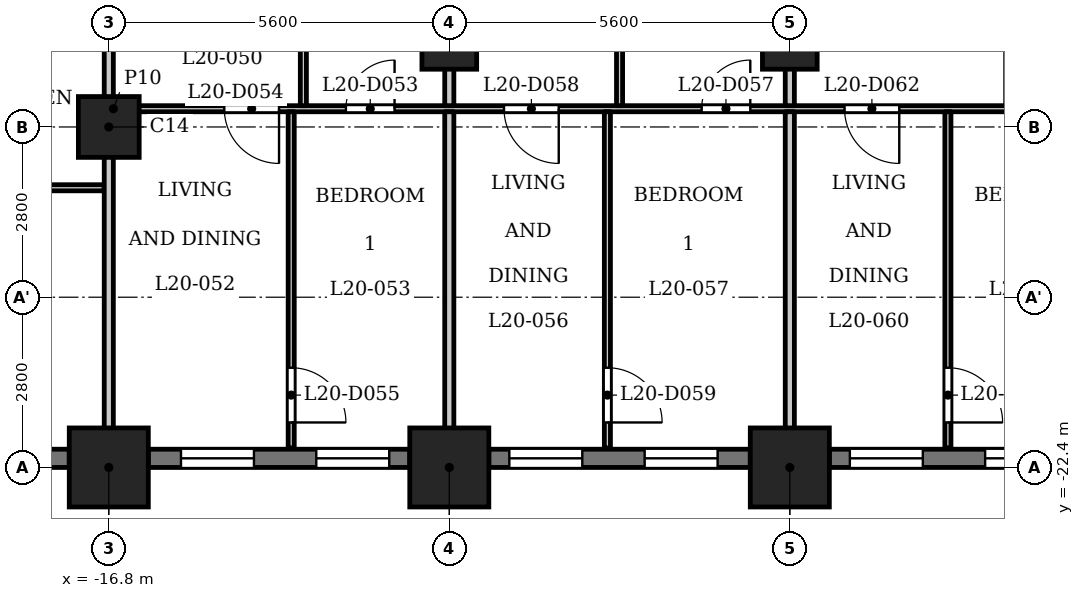
"""IFC4 building model, lengths in metres.
Left out: names, types, materials, properties, quantities, classifications, styles, units other than length and angle.
Written with IfcOpenShell. Run it as: python <this file> out.ifc"""

import sys

from ifc_helpers import new_model, si_unit, direction, frame, frame_2d, origin, origin_2d, place, context, subcontext, project, spatial, rectangle, extrude, element, fill, save


model = new_model("IFC4")
c1 = context("Model", 3, precision=1e-05, world=origin(), true_north=direction((0.0, 1.0)))
c2 = subcontext(c1, "Body", "Model", "MODEL_VIEW")
j1 = project(units=[si_unit("LENGTHUNIT", "METRE"), si_unit("PLANEANGLEUNIT", "RADIAN")], contexts=[c1])
p1 = place(None, origin())
s1 = spatial("IfcSite", under=j1, at=p1, CompositionType="ELEMENT")
p2 = place(p1, origin())
s2 = spatial("IfcBuilding", under=s1, at=p2, CompositionType="ELEMENT")
p3 = place(p2, frame((0.0, 0.0, 83.3)))
s3 = spatial("IfcBuildingStorey", under=s2, at=p3, CompositionType="ELEMENT", Elevation=83.3)
for number, where, z_axis, x_axis in (
    (1, (-16.8, -22.4, 0.0), (0.0, 0.0, 1.0), (1.0, 0.0, 0.0)),
    (2, (-11.2, -22.4, 0.0), (0.0, 0.0, 1.0), (1.0, 0.0, 0.0)),
    (3, (-5.6, -22.4, 0.0), (0.0, 0.0, 1.0), (1.0, 0.0, 0.0)),
):
    element("IfcColumn", number, at=place(p3, frame(where, z_axis=z_axis, x_axis=x_axis)), inside=s3, PredefinedType="COLUMN", context=c2, shape_type="SweptSolid", body=[
        extrude(rectangle(XDim=1.3, YDim=1.3, at=origin_2d()), origin(), (0.0, 0.0, 1.0), 3.5),
    ])
p4 = place(p3, frame((-16.8, -16.8, 0.0), z_axis=(0.0, 0.0, 1.0), x_axis=(1.0, 0.0, 0.0)))
e4 = element("IfcColumn", 4, at=p4, inside=s3, PredefinedType="COLUMN", context=c2, shape_type="SweptSolid", body=[
    extrude(rectangle(XDim=1.0, YDim=1.0, at=origin_2d()), origin(), (0.0, 0.0, 1.0), 3.5),
])
for number, where, z_axis, x_axis in (
    (5, (-11.2, -15.4, 0.0), (0.0, 0.0, 1.0), (1.0, 0.0, 0.0)),
    (6, (-5.6, -15.4, 0.0), (0.0, 0.0, 1.0), (1.0, 0.0, 0.0)),
):
    element("IfcColumn", number, at=place(p3, frame(where, z_axis=z_axis, x_axis=x_axis)), inside=s3, PredefinedType="COLUMN", context=c2, shape_type="SweptSolid", body=[
        extrude(rectangle(XDim=0.9, YDim=0.9, at=origin_2d()), origin(), (0.0, 0.0, 1.0), 3.5),
    ])
p5 = place(p3, frame((-20.0, -22.25, 0.0), z_axis=(0.0, 0.0, 1.0), x_axis=(1.0, 0.0, 0.0)))
e7 = element("IfcWall", 7, at=p5, inside=s3, PredefinedType="SOLIDWALL", context=c2, shape_type="SweptSolid", body=[
    extrude(rectangle(XDim=2.55, YDim=0.3, at=frame_2d((1.275, 0.0))), origin(), (0.0, 0.0, 1.0), 2.4),
])
p6 = place(p5, frame((0.675, 0.0, 0.6)))
e8 = element("IfcOpeningElement", 8, at=p6, cuts=e7, PredefinedType="OPENING", context=c2, shape_type="SweptSolid", body=[
    extrude(rectangle(XDim=1.2, YDim=1.55, at=frame_2d((0.6, 0.775))), frame((0.0, 0.16, 0.0), z_axis=(0.0, -1.0, 0.0), x_axis=(1.0, 0.0, 0.0)), (0.0, 0.0, 1.0), 0.32),
])
p7 = place(p3, frame((-16.15, -22.25, 0.0), z_axis=(0.0, 0.0, 1.0), x_axis=(1.0, 0.0, 0.0)))
e9 = element("IfcWall", 9, at=p7, inside=s3, PredefinedType="SOLIDWALL", context=c2, shape_type="SweptSolid", body=[
    extrude(rectangle(XDim=4.3, YDim=0.3, at=frame_2d((2.15, 0.0))), origin(), (0.0, 0.0, 1.0), 2.4),
])
p8 = place(p7, frame((0.538, 0.0, 0.6)))
e10 = element("IfcOpeningElement", 10, at=p8, cuts=e9, PredefinedType="OPENING", context=c2, shape_type="SweptSolid", body=[
    extrude(rectangle(XDim=1.2, YDim=1.55, at=frame_2d((0.6, 0.775))), frame((0.0, 0.16, 0.0), z_axis=(0.0, -1.0, 0.0), x_axis=(1.0, 0.0, 0.0)), (0.0, 0.0, 1.0), 0.32),
])
p9 = place(p7, frame((2.762, 0.0, 0.6)))
e11 = element("IfcOpeningElement", 11, at=p9, cuts=e9, PredefinedType="OPENING", context=c2, shape_type="SweptSolid", body=[
    extrude(rectangle(XDim=1.2, YDim=1.55, at=frame_2d((0.6, 0.775))), frame((0.0, 0.16, 0.0), z_axis=(0.0, -1.0, 0.0), x_axis=(1.0, 0.0, 0.0)), (0.0, 0.0, 1.0), 0.32),
])
p10 = place(p3, frame((-10.55, -22.25, 0.0), z_axis=(0.0, 0.0, 1.0), x_axis=(1.0, 0.0, 0.0)))
e12 = element("IfcWall", 12, at=p10, inside=s3, PredefinedType="SOLIDWALL", context=c2, shape_type="SweptSolid", body=[
    extrude(rectangle(XDim=4.3, YDim=0.3, at=frame_2d((2.15, 0.0))), origin(), (0.0, 0.0, 1.0), 2.4),
])
p11 = place(p10, frame((0.337, 0.0, 0.6)))
e13 = element("IfcOpeningElement", 13, at=p11, cuts=e12, PredefinedType="OPENING", context=c2, shape_type="SweptSolid", body=[
    extrude(rectangle(XDim=1.2, YDim=1.55, at=frame_2d((0.6, 0.775))), frame((0.0, 0.16, 0.0), z_axis=(0.0, -1.0, 0.0), x_axis=(1.0, 0.0, 0.0)), (0.0, 0.0, 1.0), 0.32),
])
p12 = place(p10, frame((2.562, 0.0, 0.6)))
e14 = element("IfcOpeningElement", 14, at=p12, cuts=e12, PredefinedType="OPENING", context=c2, shape_type="SweptSolid", body=[
    extrude(rectangle(XDim=1.2, YDim=1.55, at=frame_2d((0.6, 0.775))), frame((0.0, 0.16, 0.0), z_axis=(0.0, -1.0, 0.0), x_axis=(1.0, 0.0, 0.0)), (0.0, 0.0, 1.0), 0.32),
])
p13 = place(p3, frame((-4.95, -22.25, 0.0), z_axis=(0.0, 0.0, 1.0), x_axis=(1.0, 0.0, 0.0)))
e15 = element("IfcWall", 15, at=p13, inside=s3, PredefinedType="SOLIDWALL", context=c2, shape_type="SweptSolid", body=[
    extrude(rectangle(XDim=4.3, YDim=0.3, at=frame_2d((2.15, 0.0))), origin(), (0.0, 0.0, 1.0), 2.4),
])
p14 = place(p13, frame((0.337, 0.0, 0.6)))
e16 = element("IfcOpeningElement", 16, at=p14, cuts=e15, PredefinedType="OPENING", context=c2, shape_type="SweptSolid", body=[
    extrude(rectangle(XDim=1.2, YDim=1.55, at=frame_2d((0.6, 0.775))), frame((0.0, 0.16, 0.0), z_axis=(0.0, -1.0, 0.0), x_axis=(1.0, 0.0, 0.0)), (0.0, 0.0, 1.0), 0.32),
])
p15 = place(p13, frame((2.562, 0.0, 0.6)))
e17 = element("IfcOpeningElement", 17, at=p15, cuts=e15, PredefinedType="OPENING", context=c2, shape_type="SweptSolid", body=[
    extrude(rectangle(XDim=1.2, YDim=1.55, at=frame_2d((0.6, 0.775))), frame((0.0, 0.16, 0.0), z_axis=(0.0, -1.0, 0.0), x_axis=(1.0, 0.0, 0.0)), (0.0, 0.0, 1.0), 0.32),
])
p16 = place(p3, frame((-26.394, -17.8, 0.0), z_axis=(0.0, 0.0, 1.0), x_axis=(1.0, 0.0, 0.0)))
e18 = element("IfcWall", 18, at=p16, inside=s3, PredefinedType="PARTITIONING", context=c2, shape_type="SweptSolid", body=[
    extrude(rectangle(XDim=9.519, YDim=0.1, at=frame_2d((4.76, 0.0))), origin(), (0.0, 0.0, 1.0), 3.2),
])
p17 = place(p16, frame((0.794, 0.0, 0.0)))
e19 = element("IfcOpeningElement", 19, at=p17, cuts=e18, PredefinedType="OPENING", context=c2, shape_type="SweptSolid", body=[
    extrude(rectangle(XDim=0.8, YDim=2.1, at=frame_2d((0.4, 1.05))), frame((0.0, 0.06, 0.0), z_axis=(0.0, -1.0, 0.0), x_axis=(1.0, 0.0, 0.0)), (0.0, 0.0, 1.0), 0.12),
])
p18 = place(p16, frame((5.644, 0.0, 0.0)))
e20 = element("IfcOpeningElement", 20, at=p18, cuts=e18, PredefinedType="OPENING", context=c2, shape_type="SweptSolid", body=[
    extrude(rectangle(XDim=0.9, YDim=2.1, at=frame_2d((0.45, 1.05))), frame((0.0, 0.06, 0.0), z_axis=(0.0, -1.0, 0.0), x_axis=(1.0, 0.0, 0.0)), (0.0, 0.0, 1.0), 0.12),
])
p19 = place(p3, frame((-16.725, -16.5, 0.0), z_axis=(0.0, 0.0, 1.0), x_axis=(1.0, 0.0, 0.0)))
e21 = element("IfcWall", 21, at=p19, inside=s3, PredefinedType="PARTITIONING", context=c2, shape_type="SweptSolid", body=[
    extrude(rectangle(XDim=33.45, YDim=0.1, at=frame_2d((16.725, 0.0))), origin(), (0.0, 0.0, 1.0), 3.2),
])
p20 = place(p19, frame((3.825, 0.0, 0.0)))
e22 = element("IfcOpeningElement", 22, at=p20, cuts=e21, PredefinedType="OPENING", context=c2, shape_type="SweptSolid", body=[
    extrude(rectangle(XDim=0.8, YDim=2.1, at=frame_2d((0.4, 1.05))), frame((0.0, 0.06, 0.0), z_axis=(0.0, -1.0, 0.0), x_axis=(1.0, 0.0, 0.0)), (0.0, 0.0, 1.0), 0.12),
])
p21 = place(p19, frame((1.825, 0.0, 0.0)))
e23 = element("IfcOpeningElement", 23, at=p21, cuts=e21, PredefinedType="OPENING", context=c2, shape_type="SweptSolid", body=[
    extrude(rectangle(XDim=0.9, YDim=2.1, at=frame_2d((0.45, 1.05))), frame((0.0, 0.06, 0.0), z_axis=(0.0, -1.0, 0.0), x_axis=(1.0, 0.0, 0.0)), (0.0, 0.0, 1.0), 0.12),
])
p22 = place(p19, frame((9.675, 0.0, 0.0)))
e24 = element("IfcOpeningElement", 24, at=p22, cuts=e21, PredefinedType="OPENING", context=c2, shape_type="SweptSolid", body=[
    extrude(rectangle(XDim=0.8, YDim=2.1, at=frame_2d((0.4, 1.05))), frame((0.0, 0.06, 0.0), z_axis=(0.0, -1.0, 0.0), x_axis=(1.0, 0.0, 0.0)), (0.0, 0.0, 1.0), 0.12),
])
p23 = place(p19, frame((6.425, 0.0, 0.0)))
e25 = element("IfcOpeningElement", 25, at=p23, cuts=e21, PredefinedType="OPENING", context=c2, shape_type="SweptSolid", body=[
    extrude(rectangle(XDim=0.9, YDim=2.1, at=frame_2d((0.45, 1.05))), frame((0.0, 0.06, 0.0), z_axis=(0.0, -1.0, 0.0), x_axis=(1.0, 0.0, 0.0)), (0.0, 0.0, 1.0), 0.12),
])
p24 = place(p19, frame((15.275, 0.0, 0.0)))
e26 = element("IfcOpeningElement", 26, at=p24, cuts=e21, PredefinedType="OPENING", context=c2, shape_type="SweptSolid", body=[
    extrude(rectangle(XDim=0.8, YDim=2.1, at=frame_2d((0.4, 1.05))), frame((0.0, 0.06, 0.0), z_axis=(0.0, -1.0, 0.0), x_axis=(1.0, 0.0, 0.0)), (0.0, 0.0, 1.0), 0.12),
])
p25 = place(p19, frame((12.025, 0.0, 0.0)))
e27 = element("IfcOpeningElement", 27, at=p25, cuts=e21, PredefinedType="OPENING", context=c2, shape_type="SweptSolid", body=[
    extrude(rectangle(XDim=0.9, YDim=2.1, at=frame_2d((0.45, 1.05))), frame((0.0, 0.06, 0.0), z_axis=(0.0, -1.0, 0.0), x_axis=(1.0, 0.0, 0.0)), (0.0, 0.0, 1.0), 0.12),
])
p26 = place(p19, frame((20.875, 0.0, 0.0)))
e28 = element("IfcOpeningElement", 28, at=p26, cuts=e21, PredefinedType="OPENING", context=c2, shape_type="SweptSolid", body=[
    extrude(rectangle(XDim=0.8, YDim=2.1, at=frame_2d((0.4, 1.05))), frame((0.0, 0.06, 0.0), z_axis=(0.0, -1.0, 0.0), x_axis=(1.0, 0.0, 0.0)), (0.0, 0.0, 1.0), 0.12),
])
p27 = place(p19, frame((18.625, 0.0, 0.0)))
e29 = element("IfcOpeningElement", 29, at=p27, cuts=e21, PredefinedType="OPENING", context=c2, shape_type="SweptSolid", body=[
    extrude(rectangle(XDim=0.9, YDim=2.1, at=frame_2d((0.45, 1.05))), frame((0.0, 0.06, 0.0), z_axis=(0.0, -1.0, 0.0), x_axis=(1.0, 0.0, 0.0)), (0.0, 0.0, 1.0), 0.12),
])
p28 = place(p19, frame((23.875, 0.0, 0.0)))
e30 = element("IfcOpeningElement", 30, at=p28, cuts=e21, PredefinedType="OPENING", context=c2, shape_type="SweptSolid", body=[
    extrude(rectangle(XDim=0.8, YDim=2.1, at=frame_2d((0.4, 1.05))), frame((0.0, 0.06, 0.0), z_axis=(0.0, -1.0, 0.0), x_axis=(1.0, 0.0, 0.0)), (0.0, 0.0, 1.0), 0.12),
])
p29 = place(p19, frame((26.225, 0.0, 0.0)))
e31 = element("IfcOpeningElement", 31, at=p29, cuts=e21, PredefinedType="OPENING", context=c2, shape_type="SweptSolid", body=[
    extrude(rectangle(XDim=0.9, YDim=2.1, at=frame_2d((0.45, 1.05))), frame((0.0, 0.06, 0.0), z_axis=(0.0, -1.0, 0.0), x_axis=(1.0, 0.0, 0.0)), (0.0, 0.0, 1.0), 0.12),
])
p30 = place(p19, frame((28.575, 0.0, 0.0)))
e32 = element("IfcOpeningElement", 32, at=p30, cuts=e21, PredefinedType="OPENING", context=c2, shape_type="SweptSolid", body=[
    extrude(rectangle(XDim=0.9, YDim=2.1, at=frame_2d((0.45, 1.05))), frame((0.0, 0.06, 0.0), z_axis=(0.0, -1.0, 0.0), x_axis=(1.0, 0.0, 0.0)), (0.0, 0.0, 1.0), 0.12),
])
p31 = place(p19, frame((30.675, 0.0, 0.0)))
e33 = element("IfcOpeningElement", 33, at=p31, cuts=e21, PredefinedType="OPENING", context=c2, shape_type="SweptSolid", body=[
    extrude(rectangle(XDim=0.9, YDim=2.1, at=frame_2d((0.45, 1.05))), frame((0.0, 0.06, 0.0), z_axis=(0.0, -1.0, 0.0), x_axis=(1.0, 0.0, 0.0)), (0.0, 0.0, 1.0), 0.12),
])
p32 = place(p3, frame((-16.8, -23.03, 0.0), z_axis=(0.0, 0.0, 1.0), x_axis=(0.0, 1.0, 0.0)))
e34 = element("IfcWall", 34, at=p32, inside=s3, PredefinedType="PARTITIONING", context=c2, shape_type="SweptSolid", body=[
    extrude(rectangle(XDim=7.555, YDim=0.15, at=frame_2d((3.777, 0.0))), origin(), (0.0, 0.0, 1.0), 3.2),
])
p33 = place(p3, frame((-13.8, -22.08, 0.0), z_axis=(0.0, 0.0, 1.0), x_axis=(0.0, 1.0, 0.0)))
e35 = element("IfcWall", 35, at=p33, inside=s3, PredefinedType="PARTITIONING", context=c2, shape_type="SweptSolid", body=[
    extrude(rectangle(XDim=5.53, YDim=0.1, at=frame_2d((2.765, 0.0))), origin(), (0.0, 0.0, 1.0), 3.2),
])
p34 = place(p33, frame((0.42, 0.0, 0.0)))
e36 = element("IfcOpeningElement", 36, at=p34, cuts=e35, PredefinedType="OPENING", context=c2, shape_type="SweptSolid", body=[
    extrude(rectangle(XDim=0.9, YDim=2.1, at=frame_2d((0.45, 1.05))), frame((0.0, 0.06, 0.0), z_axis=(0.0, -1.0, 0.0), x_axis=(1.0, 0.0, 0.0)), (0.0, 0.0, 1.0), 0.12),
])
p35 = place(p3, frame((-13.6, -16.45, 0.0), z_axis=(0.0, 0.0, 1.0), x_axis=(0.0, 1.0, 0.0)))
e37 = element("IfcWall", 37, at=p35, inside=s3, PredefinedType="PARTITIONING", context=c2, shape_type="SweptSolid", body=[
    extrude(rectangle(XDim=3.175, YDim=0.1, at=frame_2d((1.587, 0.0))), origin(), (0.0, 0.0, 1.0), 3.2),
])
p36 = place(p3, frame((-11.2, -23.03, 0.0), z_axis=(0.0, 0.0, 1.0), x_axis=(0.0, 1.0, 0.0)))
e38 = element("IfcWall", 38, at=p36, inside=s3, PredefinedType="PARTITIONING", context=c2, shape_type="SweptSolid", body=[
    extrude(rectangle(XDim=6.48, YDim=0.15, at=frame_2d((3.24, 0.0))), origin(), (0.0, 0.0, 1.0), 3.2),
])
p37 = place(p3, frame((-11.2, -16.45, 0.0), z_axis=(0.0, 0.0, 1.0), x_axis=(0.0, 1.0, 0.0)))
e39 = element("IfcWall", 39, at=p37, inside=s3, PredefinedType="PARTITIONING", context=c2, shape_type="SweptSolid", body=[
    extrude(rectangle(XDim=3.175, YDim=0.15, at=frame_2d((1.587, 0.0))), origin(), (0.0, 0.0, 1.0), 3.2),
])
p38 = place(p3, frame((-8.6, -22.08, 0.0), z_axis=(0.0, 0.0, 1.0), x_axis=(0.0, 1.0, 0.0)))
e40 = element("IfcWall", 40, at=p38, inside=s3, PredefinedType="PARTITIONING", context=c2, shape_type="SweptSolid", body=[
    extrude(rectangle(XDim=5.53, YDim=0.1, at=frame_2d((2.765, 0.0))), origin(), (0.0, 0.0, 1.0), 3.2),
])
p39 = place(p38, frame((0.42, 0.0, 0.0)))
e41 = element("IfcOpeningElement", 41, at=p39, cuts=e40, PredefinedType="OPENING", context=c2, shape_type="SweptSolid", body=[
    extrude(rectangle(XDim=0.9, YDim=2.1, at=frame_2d((0.45, 1.05))), frame((0.0, 0.06, 0.0), z_axis=(0.0, -1.0, 0.0), x_axis=(1.0, 0.0, 0.0)), (0.0, 0.0, 1.0), 0.12),
])
p40 = place(p3, frame((-8.4, -16.45, 0.0), z_axis=(0.0, 0.0, 1.0), x_axis=(0.0, 1.0, 0.0)))
e42 = element("IfcWall", 42, at=p40, inside=s3, PredefinedType="PARTITIONING", context=c2, shape_type="SweptSolid", body=[
    extrude(rectangle(XDim=3.175, YDim=0.1, at=frame_2d((1.587, 0.0))), origin(), (0.0, 0.0, 1.0), 3.2),
])
p41 = place(p3, frame((-5.6, -23.03, 0.0), z_axis=(0.0, 0.0, 1.0), x_axis=(0.0, 1.0, 0.0)))
e43 = element("IfcWall", 43, at=p41, inside=s3, PredefinedType="PARTITIONING", context=c2, shape_type="SweptSolid", body=[
    extrude(rectangle(XDim=6.48, YDim=0.15, at=frame_2d((3.24, 0.0))), origin(), (0.0, 0.0, 1.0), 3.2),
])
p42 = place(p3, frame((-5.6, -16.45, 0.0), z_axis=(0.0, 0.0, 1.0), x_axis=(0.0, 1.0, 0.0)))
e44 = element("IfcWall", 44, at=p42, inside=s3, PredefinedType="PARTITIONING", context=c2, shape_type="SweptSolid", body=[
    extrude(rectangle(XDim=3.175, YDim=0.15, at=frame_2d((1.587, 0.0))), origin(), (0.0, 0.0, 1.0), 3.2),
])
p43 = place(p3, frame((-3.0, -22.08, 0.0), z_axis=(0.0, 0.0, 1.0), x_axis=(0.0, 1.0, 0.0)))
e45 = element("IfcWall", 45, at=p43, inside=s3, PredefinedType="PARTITIONING", context=c2, shape_type="SweptSolid", body=[
    extrude(rectangle(XDim=5.53, YDim=0.1, at=frame_2d((2.765, 0.0))), origin(), (0.0, 0.0, 1.0), 3.2),
])
p44 = place(p43, frame((0.42, 0.0, 0.0)))
e46 = element("IfcOpeningElement", 46, at=p44, cuts=e45, PredefinedType="OPENING", context=c2, shape_type="SweptSolid", body=[
    extrude(rectangle(XDim=0.9, YDim=2.1, at=frame_2d((0.45, 1.05))), frame((0.0, 0.06, 0.0), z_axis=(0.0, -1.0, 0.0), x_axis=(1.0, 0.0, 0.0)), (0.0, 0.0, 1.0), 0.12),
])
p45 = place(p20, origin())
e47 = element("IfcDoor", 47, at=p45, inside=s3, OperationType="SINGLE_SWING_LEFT", PredefinedType="DOOR", context=c2, shape_type="SweptSolid", body=[
    extrude(rectangle(XDim=0.8, YDim=2.1, at=frame_2d((0.4, 1.05))), frame((0.0, 0.025, 0.0), z_axis=(0.0, -1.0, 0.0), x_axis=(1.0, 0.0, 0.0)), (0.0, 0.0, 1.0), 0.05),
])
fill(e22, e47)
p46 = place(p21, origin())
e48 = element("IfcDoor", 48, at=p46, inside=s3, OperationType="SINGLE_SWING_RIGHT", PredefinedType="DOOR", context=c2, shape_type="SweptSolid", body=[
    extrude(rectangle(XDim=0.9, YDim=2.1, at=frame_2d((0.45, 1.05))), frame((0.0, 0.025, 0.0), z_axis=(0.0, -1.0, 0.0), x_axis=(1.0, 0.0, 0.0)), (0.0, 0.0, 1.0), 0.05),
])
fill(e23, e48)
p47 = place(p34, origin())
e49 = element("IfcDoor", 49, at=p47, inside=s3, OperationType="SINGLE_SWING_LEFT", PredefinedType="DOOR", context=c2, shape_type="SweptSolid", body=[
    extrude(rectangle(XDim=0.9, YDim=2.1, at=frame_2d((0.45, 1.05))), frame((0.0, 0.025, 0.0), z_axis=(0.0, -1.0, 0.0), x_axis=(1.0, 0.0, 0.0)), (0.0, 0.0, 1.0), 0.05),
])
fill(e36, e49)
p48 = place(p22, origin())
e50 = element("IfcDoor", 50, at=p48, inside=s3, OperationType="SINGLE_SWING_LEFT", PredefinedType="DOOR", context=c2, shape_type="SweptSolid", body=[
    extrude(rectangle(XDim=0.8, YDim=2.1, at=frame_2d((0.4, 1.05))), frame((0.0, 0.025, 0.0), z_axis=(0.0, -1.0, 0.0), x_axis=(1.0, 0.0, 0.0)), (0.0, 0.0, 1.0), 0.05),
])
fill(e24, e50)
p49 = place(p23, origin())
e51 = element("IfcDoor", 51, at=p49, inside=s3, OperationType="SINGLE_SWING_RIGHT", PredefinedType="DOOR", context=c2, shape_type="SweptSolid", body=[
    extrude(rectangle(XDim=0.9, YDim=2.1, at=frame_2d((0.45, 1.05))), frame((0.0, 0.025, 0.0), z_axis=(0.0, -1.0, 0.0), x_axis=(1.0, 0.0, 0.0)), (0.0, 0.0, 1.0), 0.05),
])
fill(e25, e51)
p50 = place(p39, origin())
e52 = element("IfcDoor", 52, at=p50, inside=s3, OperationType="SINGLE_SWING_LEFT", PredefinedType="DOOR", context=c2, shape_type="SweptSolid", body=[
    extrude(rectangle(XDim=0.9, YDim=2.1, at=frame_2d((0.45, 1.05))), frame((0.0, 0.025, 0.0), z_axis=(0.0, -1.0, 0.0), x_axis=(1.0, 0.0, 0.0)), (0.0, 0.0, 1.0), 0.05),
])
fill(e41, e52)
p51 = place(p25, origin())
e53 = element("IfcDoor", 53, at=p51, inside=s3, OperationType="SINGLE_SWING_RIGHT", PredefinedType="DOOR", context=c2, shape_type="SweptSolid", body=[
    extrude(rectangle(XDim=0.9, YDim=2.1, at=frame_2d((0.45, 1.05))), frame((0.0, 0.025, 0.0), z_axis=(0.0, -1.0, 0.0), x_axis=(1.0, 0.0, 0.0)), (0.0, 0.0, 1.0), 0.05),
])
fill(e27, e53)
p52 = place(p44, origin())
e54 = element("IfcDoor", 54, at=p52, inside=s3, OperationType="SINGLE_SWING_LEFT", PredefinedType="DOOR", context=c2, shape_type="SweptSolid", body=[
    extrude(rectangle(XDim=0.9, YDim=2.1, at=frame_2d((0.45, 1.05))), frame((0.0, 0.025, 0.0), z_axis=(0.0, -1.0, 0.0), x_axis=(1.0, 0.0, 0.0)), (0.0, 0.0, 1.0), 0.05),
])
fill(e46, e54)
p53 = place(p8, origin())
e55 = element("IfcWindow", 55, at=p53, inside=s3, PartitioningType="SINGLE_PANEL", PredefinedType="WINDOW", context=c2, shape_type="SweptSolid", body=[
    extrude(rectangle(XDim=1.2, YDim=1.55, at=frame_2d((0.6, 0.775))), frame((0.0, 0.03, 0.0), z_axis=(0.0, -1.0, 0.0), x_axis=(1.0, 0.0, 0.0)), (0.0, 0.0, 1.0), 0.06),
])
fill(e10, e55)
p54 = place(p9, origin())
e56 = element("IfcWindow", 56, at=p54, inside=s3, PartitioningType="SINGLE_PANEL", PredefinedType="WINDOW", context=c2, shape_type="SweptSolid", body=[
    extrude(rectangle(XDim=1.2, YDim=1.55, at=frame_2d((0.6, 0.775))), frame((0.0, 0.03, 0.0), z_axis=(0.0, -1.0, 0.0), x_axis=(1.0, 0.0, 0.0)), (0.0, 0.0, 1.0), 0.06),
])
fill(e11, e56)
p55 = place(p11, origin())
e57 = element("IfcWindow", 57, at=p55, inside=s3, PartitioningType="SINGLE_PANEL", PredefinedType="WINDOW", context=c2, shape_type="SweptSolid", body=[
    extrude(rectangle(XDim=1.2, YDim=1.55, at=frame_2d((0.6, 0.775))), frame((0.0, 0.03, 0.0), z_axis=(0.0, -1.0, 0.0), x_axis=(1.0, 0.0, 0.0)), (0.0, 0.0, 1.0), 0.06),
])
fill(e13, e57)
p56 = place(p12, origin())
e58 = element("IfcWindow", 58, at=p56, inside=s3, PartitioningType="SINGLE_PANEL", PredefinedType="WINDOW", context=c2, shape_type="SweptSolid", body=[
    extrude(rectangle(XDim=1.2, YDim=1.55, at=frame_2d((0.6, 0.775))), frame((0.0, 0.03, 0.0), z_axis=(0.0, -1.0, 0.0), x_axis=(1.0, 0.0, 0.0)), (0.0, 0.0, 1.0), 0.06),
])
fill(e14, e58)
p57 = place(p14, origin())
e59 = element("IfcWindow", 59, at=p57, inside=s3, PartitioningType="SINGLE_PANEL", PredefinedType="WINDOW", context=c2, shape_type="SweptSolid", body=[
    extrude(rectangle(XDim=1.2, YDim=1.55, at=frame_2d((0.6, 0.775))), frame((0.0, 0.03, 0.0), z_axis=(0.0, -1.0, 0.0), x_axis=(1.0, 0.0, 0.0)), (0.0, 0.0, 1.0), 0.06),
])
fill(e16, e59)
p58 = place(p15, origin())
e60 = element("IfcWindow", 60, at=p58, inside=s3, PartitioningType="SINGLE_PANEL", PredefinedType="WINDOW", context=c2, shape_type="SweptSolid", body=[
    extrude(rectangle(XDim=1.2, YDim=1.55, at=frame_2d((0.6, 0.775))), frame((0.0, 0.03, 0.0), z_axis=(0.0, -1.0, 0.0), x_axis=(1.0, 0.0, 0.0)), (0.0, 0.0, 1.0), 0.06),
])
fill(e17, e60)
save(model, sys.argv[1])
